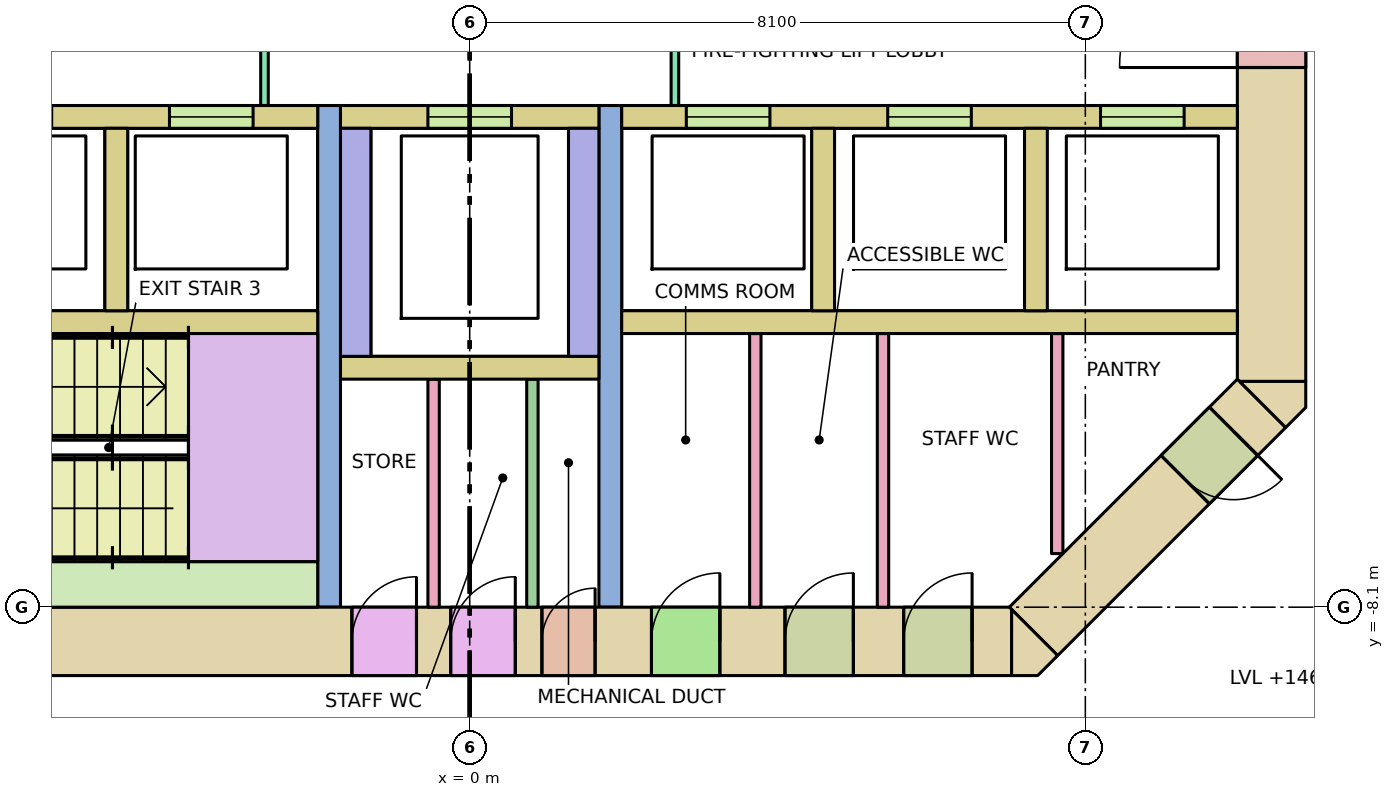
"""IFC4 building model, lengths in metres.
Left out: names, types, materials, properties, quantities, classifications, styles, units other than length and angle.
Written with IfcOpenShell. Run it as: python <this file> out.ifc"""

import sys

from ifc_helpers import new_model, si_unit, direction, frame, frame_2d, origin, place, context, subcontext, project, spatial, polyline, rectangle, outline, extrude, element, fill, save


model = new_model("IFC4")
c1 = context("Model", 3, precision=1e-05, world=origin(), true_north=direction((0.0, 1.0)))
c2 = subcontext(c1, "Body", "Model", "MODEL_VIEW")
j1 = project(units=[si_unit("LENGTHUNIT", "METRE"), si_unit("PLANEANGLEUNIT", "RADIAN")], contexts=[c1])
p1 = place(None, origin())
s1 = spatial("IfcSite", under=j1, at=p1, CompositionType="ELEMENT")
p2 = place(p1, origin())
s2 = spatial("IfcBuilding", under=s1, at=p2, CompositionType="ELEMENT")
p3 = place(p2, frame((0.0, 0.0, 146.6)))
s3 = spatial("IfcBuildingStorey", under=s2, at=p3, CompositionType="ELEMENT", Elevation=146.6)
p4 = place(p3, frame((-7.13, -8.55, -0.28), z_axis=(0.0, 0.0, 1.0), x_axis=(1.0, 0.0, 0.0)))
e1 = element("IfcWall", 1, at=p4, inside=s3, PredefinedType="SHEAR", context=c2, shape_type="SweptSolid", body=[
    extrude(rectangle(XDim=14.26, YDim=0.9, at=frame_2d((7.13, 0.0))), origin(), (0.0, 0.0, 1.0), 7.6),
])
p5 = place(p4, frame((8.08, 0.0, 0.28)))
e2 = element("IfcOpeningElement", 2, at=p5, cuts=e1, PredefinedType="OPENING", context=c2, shape_type="SweptSolid", body=[
    extrude(rectangle(XDim=0.7, YDim=2.1, at=frame_2d((0.35, 1.05))), frame((0.0, 0.46, 0.0), z_axis=(0.0, -1.0, 0.0), x_axis=(1.0, 0.0, 0.0)), (0.0, 0.0, 1.0), 0.92),
])
p6 = place(p4, frame((5.58, 0.0, 0.28)))
e3 = element("IfcOpeningElement", 3, at=p6, cuts=e1, PredefinedType="OPENING", context=c2, shape_type="SweptSolid", body=[
    extrude(rectangle(XDim=0.85, YDim=2.1, at=frame_2d((0.425, 1.05))), frame((0.0, 0.46, 0.0), z_axis=(0.0, -1.0, 0.0), x_axis=(1.0, 0.0, 0.0)), (0.0, 0.0, 1.0), 0.92),
])
p7 = place(p4, frame((6.88, 0.0, 0.28)))
e4 = element("IfcOpeningElement", 4, at=p7, cuts=e1, PredefinedType="OPENING", context=c2, shape_type="SweptSolid", body=[
    extrude(rectangle(XDim=0.85, YDim=2.1, at=frame_2d((0.425, 1.05))), frame((0.0, 0.46, 0.0), z_axis=(0.0, -1.0, 0.0), x_axis=(1.0, 0.0, 0.0)), (0.0, 0.0, 1.0), 0.92),
])
p8 = place(p4, frame((9.521, 0.0, 0.28)))
e5 = element("IfcOpeningElement", 5, at=p8, cuts=e1, PredefinedType="OPENING", context=c2, shape_type="SweptSolid", body=[
    extrude(rectangle(XDim=0.9, YDim=2.1, at=frame_2d((0.45, 1.05))), frame((0.0, 0.46, 0.0), z_axis=(0.0, -1.0, 0.0), x_axis=(1.0, 0.0, 0.0)), (0.0, 0.0, 1.0), 0.92),
])
p9 = place(p4, frame((11.278, 0.0, 0.28)))
e6 = element("IfcOpeningElement", 6, at=p9, cuts=e1, PredefinedType="OPENING", context=c2, shape_type="SweptSolid", body=[
    extrude(rectangle(XDim=0.9, YDim=2.1, at=frame_2d((0.45, 1.05))), frame((0.0, 0.46, 0.0), z_axis=(0.0, -1.0, 0.0), x_axis=(1.0, 0.0, 0.0)), (0.0, 0.0, 1.0), 0.92),
])
p10 = place(p4, frame((12.84, 0.0, 0.28)))
e7 = element("IfcOpeningElement", 7, at=p10, cuts=e1, PredefinedType="OPENING", context=c2, shape_type="SweptSolid", body=[
    extrude(rectangle(XDim=0.9, YDim=2.1, at=frame_2d((0.45, 1.05))), frame((0.0, 0.46, 0.0), z_axis=(0.0, -1.0, 0.0), x_axis=(1.0, 0.0, 0.0)), (0.0, 0.0, 1.0), 0.92),
])
p11 = place(p3, frame((10.55, -5.13, -0.28), z_axis=(0.0, 0.0, 1.0), x_axis=(0.0, 1.0, 0.0)))
e8 = element("IfcWall", 8, at=p11, inside=s3, PredefinedType="SHEAR", context=c2, shape_type="SweptSolid", body=[
    extrude(rectangle(XDim=10.26, YDim=0.9, at=frame_2d((5.13, 0.0))), origin(), (0.0, 0.0, 1.0), 7.6),
])
p12 = place(p11, frame((4.13, 0.0, 0.28)))
e9 = element("IfcOpeningElement", 9, at=p12, cuts=e8, PredefinedType="OPENING", context=c2, shape_type="SweptSolid", body=[
    extrude(rectangle(XDim=2.0, YDim=2.1, at=frame_2d((1.0, 1.05))), frame((0.0, 0.46, 0.0), z_axis=(0.0, -1.0, 0.0), x_axis=(1.0, 0.0, 0.0)), (0.0, 0.0, 1.0), 0.92),
])
p13 = place(p3, frame((10.418, -5.418, -0.28), z_axis=(0.0, 0.0, 1.0), x_axis=(-0.707106781187, -0.707106781187, 0.0)))
e10 = element("IfcWall", 10, at=p13, inside=s3, PredefinedType="SHEAR", context=c2, shape_type="SweptSolid", body=[
    extrude(rectangle(XDim=4.243, YDim=0.9, at=frame_2d((2.121, 0.0))), origin(), (0.0, 0.0, 1.0), 7.6),
])
p14 = place(p13, frame((0.52, 0.0, 0.28)))
e11 = element("IfcOpeningElement", 11, at=p14, cuts=e10, PredefinedType="OPENING", context=c2, shape_type="SweptSolid", body=[
    extrude(rectangle(XDim=0.9, YDim=2.1, at=frame_2d((0.45, 1.05))), frame((0.0, 0.46, 0.0), z_axis=(0.0, -1.0, 0.0), x_axis=(1.0, 0.0, 0.0)), (0.0, 0.0, 1.0), 0.92),
])
p15 = place(p3, frame((0.0, 0.0, -0.28)))
e12 = element("IfcWall", 12, at=p15, inside=s3, PredefinedType="SHEAR", context=c2, shape_type="SweptSolid", body=[
    extrude(outline(polyline([(7.473, -9.0), (7.13, -9.0), (7.13, -8.13), (7.736, -8.736), (7.473, -9.0)])), origin(), (0.0, 0.0, 1.0), 7.6),
])
p16 = place(p3, frame((0.0, 0.0, -0.28)))
e13 = element("IfcWall", 13, at=p16, inside=s3, PredefinedType="SHEAR", context=c2, shape_type="SweptSolid", body=[
    extrude(outline(polyline([(11.0, -5.473), (10.736, -5.736), (10.13, -5.13), (11.0, -5.13), (11.0, -5.473)])), origin(), (0.0, 0.0, 1.0), 7.6),
])
for number, where, z_axis, x_axis in (
    (14, (-10.1, -4.35, 0.0), (0.0, 0.0, 1.0), (1.0, 0.0, 0.0)),
    (15, (2.0, -4.35, 0.0), (0.0, 0.0, 1.0), (1.0, 0.0, 0.0)),
):
    element("IfcWall", number, at=place(p3, frame(where, z_axis=z_axis, x_axis=x_axis)), inside=s3, PredefinedType="SOLIDWALL", context=c2, shape_type="SweptSolid", body=[
        extrude(rectangle(XDim=8.1, YDim=0.3, at=frame_2d((4.05, 0.0))), origin(), (0.0, 0.0, 1.0), 7.32),
    ])
p17 = place(p3, frame((-10.1, -1.65, 0.0), z_axis=(0.0, 0.0, 1.0), x_axis=(1.0, 0.0, 0.0)))
e16 = element("IfcWall", 16, at=p17, inside=s3, PredefinedType="SOLIDWALL", context=c2, shape_type="SweptSolid", body=[
    extrude(rectangle(XDim=8.1, YDim=0.3, at=frame_2d((4.05, 0.0))), origin(), (0.0, 0.0, 1.0), 7.32),
])
p18 = place(p17, frame((0.7, 0.0, 0.0)))
e17 = element("IfcOpeningElement", 17, at=p18, cuts=e16, PredefinedType="OPENING", context=c2, shape_type="SweptSolid", body=[
    extrude(rectangle(XDim=1.1, YDim=2.1, at=frame_2d((0.55, 1.05))), frame((0.0, 0.16, 0.0), z_axis=(0.0, -1.0, 0.0), x_axis=(1.0, 0.0, 0.0)), (0.0, 0.0, 1.0), 0.32),
])
p19 = place(p17, frame((3.5, 0.0, 0.0)))
e18 = element("IfcOpeningElement", 18, at=p19, cuts=e16, PredefinedType="OPENING", context=c2, shape_type="SweptSolid", body=[
    extrude(rectangle(XDim=1.1, YDim=2.1, at=frame_2d((0.55, 1.05))), frame((0.0, 0.16, 0.0), z_axis=(0.0, -1.0, 0.0), x_axis=(1.0, 0.0, 0.0)), (0.0, 0.0, 1.0), 0.32),
])
p20 = place(p17, frame((6.15, 0.0, 0.0)))
e19 = element("IfcOpeningElement", 19, at=p20, cuts=e16, PredefinedType="OPENING", context=c2, shape_type="SweptSolid", body=[
    extrude(rectangle(XDim=1.1, YDim=2.1, at=frame_2d((0.55, 1.05))), frame((0.0, 0.16, 0.0), z_axis=(0.0, -1.0, 0.0), x_axis=(1.0, 0.0, 0.0)), (0.0, 0.0, 1.0), 0.32),
])
p21 = place(p3, frame((2.0, -1.65, 0.0), z_axis=(0.0, 0.0, 1.0), x_axis=(1.0, 0.0, 0.0)))
e20 = element("IfcWall", 20, at=p21, inside=s3, PredefinedType="SOLIDWALL", context=c2, shape_type="SweptSolid", body=[
    extrude(rectangle(XDim=8.1, YDim=0.3, at=frame_2d((4.05, 0.0))), origin(), (0.0, 0.0, 1.0), 7.32),
])
p22 = place(p21, frame((0.85, 0.0, 0.0)))
e21 = element("IfcOpeningElement", 21, at=p22, cuts=e20, PredefinedType="OPENING", context=c2, shape_type="SweptSolid", body=[
    extrude(rectangle(XDim=1.1, YDim=2.1, at=frame_2d((0.55, 1.05))), frame((0.0, 0.16, 0.0), z_axis=(0.0, -1.0, 0.0), x_axis=(1.0, 0.0, 0.0)), (0.0, 0.0, 1.0), 0.32),
])
p23 = place(p21, frame((3.5, 0.0, 0.0)))
e22 = element("IfcOpeningElement", 22, at=p23, cuts=e20, PredefinedType="OPENING", context=c2, shape_type="SweptSolid", body=[
    extrude(rectangle(XDim=1.1, YDim=2.1, at=frame_2d((0.55, 1.05))), frame((0.0, 0.16, 0.0), z_axis=(0.0, -1.0, 0.0), x_axis=(1.0, 0.0, 0.0)), (0.0, 0.0, 1.0), 0.32),
])
p24 = place(p21, frame((6.3, 0.0, 0.0)))
e23 = element("IfcOpeningElement", 23, at=p24, cuts=e20, PredefinedType="OPENING", context=c2, shape_type="SweptSolid", body=[
    extrude(rectangle(XDim=1.1, YDim=2.1, at=frame_2d((0.55, 1.05))), frame((0.0, 0.16, 0.0), z_axis=(0.0, -1.0, 0.0), x_axis=(1.0, 0.0, 0.0)), (0.0, 0.0, 1.0), 0.32),
])
for number, where, z_axis, x_axis in (
    (24, (-4.65, -4.2, 0.0), (0.0, 0.0, 1.0), (0.0, 1.0, 0.0)),
    (25, (4.65, -4.2, 0.0), (0.0, 0.0, 1.0), (0.0, 1.0, 0.0)),
    (26, (7.45, -4.2, 0.0), (0.0, 0.0, 1.0), (0.0, 1.0, 0.0)),
):
    element("IfcWall", number, at=place(p3, frame(where, z_axis=z_axis, x_axis=x_axis)), inside=s3, PredefinedType="SOLIDWALL", context=c2, shape_type="SweptSolid", body=[
        extrude(rectangle(XDim=2.4, YDim=0.3, at=frame_2d((1.2, 0.0))), origin(), (0.0, 0.0, 1.0), 7.32),
    ])
for number, where, z_axis, x_axis in (
    (27, (-1.85, -8.1, 0.0), (0.0, 0.0, 1.0), (0.0, 1.0, 0.0)),
    (28, (1.85, -8.1, 0.0), (0.0, 0.0, 1.0), (0.0, 1.0, 0.0)),
):
    element("IfcWall", number, at=place(p3, frame(where, z_axis=z_axis, x_axis=x_axis)), inside=s3, PredefinedType="SHEAR", context=c2, shape_type="SweptSolid", body=[
        extrude(rectangle(XDim=6.6, YDim=0.3, at=frame_2d((3.3, 0.0))), origin(), (0.0, 0.0, 1.0), 7.32),
    ])
p25 = place(p3, frame((-1.7, -1.65, 0.0), z_axis=(0.0, 0.0, 1.0), x_axis=(1.0, 0.0, 0.0)))
e29 = element("IfcWall", 29, at=p25, inside=s3, PredefinedType="SOLIDWALL", context=c2, shape_type="SweptSolid", body=[
    extrude(rectangle(XDim=3.4, YDim=0.3, at=frame_2d((1.7, 0.0))), origin(), (0.0, 0.0, 1.0), 7.32),
])
p26 = place(p25, frame((1.15, 0.0, 0.0)))
e30 = element("IfcOpeningElement", 30, at=p26, cuts=e29, PredefinedType="OPENING", context=c2, shape_type="SweptSolid", body=[
    extrude(rectangle(XDim=1.1, YDim=2.1, at=frame_2d((0.55, 1.05))), frame((0.0, 0.16, 0.0), z_axis=(0.0, -1.0, 0.0), x_axis=(1.0, 0.0, 0.0)), (0.0, 0.0, 1.0), 0.32),
])
for number, where, z_axis, x_axis in (
    (31, (-1.5, -4.8, 0.0), (0.0, 0.0, 1.0), (0.0, 1.0, 0.0)),
    (32, (1.5, -4.8, 0.0), (0.0, 0.0, 1.0), (0.0, 1.0, 0.0)),
):
    element("IfcWall", number, at=place(p3, frame(where, z_axis=z_axis, x_axis=x_axis)), inside=s3, PredefinedType="SOLIDWALL", context=c2, shape_type="SweptSolid", body=[
        extrude(rectangle(XDim=3.0, YDim=0.4, at=frame_2d((1.5, 0.0))), origin(), (0.0, 0.0, 1.0), 7.32),
    ])
p27 = place(p3, frame((-1.7, -4.95, 0.0), z_axis=(0.0, 0.0, 1.0), x_axis=(1.0, 0.0, 0.0)))
e33 = element("IfcWall", 33, at=p27, inside=s3, PredefinedType="SOLIDWALL", context=c2, shape_type="SweptSolid", body=[
    extrude(rectangle(XDim=3.4, YDim=0.3, at=frame_2d((1.7, 0.0))), origin(), (0.0, 0.0, 1.0), 7.32),
])
p28 = place(p3, frame((-7.37, -7.8, 0.0), z_axis=(0.0, 0.0, 1.0), x_axis=(1.0, 0.0, 0.0)))
e34 = element("IfcWall", 34, at=p28, inside=s3, PredefinedType="SHEAR", context=c2, shape_type="SweptSolid", body=[
    extrude(rectangle(XDim=5.37, YDim=0.6, at=frame_2d((2.685, 0.0))), origin(), (0.0, 0.0, 1.0), 7.32),
])
p29 = place(p3, frame((-2.7, -1.5, 0.0), z_axis=(0.0, 0.0, 1.0), x_axis=(0.0, 1.0, 0.0)))
e35 = element("IfcWall", 35, at=p29, inside=s3, PredefinedType="PARTITIONING", context=c2, shape_type="SweptSolid", body=[
    extrude(rectangle(XDim=3.0, YDim=0.1, at=frame_2d((1.5, 0.0))), origin(), (0.0, 0.0, 1.0), 7.32),
])
p30 = place(p29, frame((0.9, 0.0, 0.0)))
e36 = element("IfcOpeningElement", 36, at=p30, cuts=e35, PredefinedType="OPENING", context=c2, shape_type="SweptSolid", body=[
    extrude(rectangle(XDim=1.2, YDim=2.1, at=frame_2d((0.6, 1.05))), frame((0.0, 0.06, 0.0), z_axis=(0.0, -1.0, 0.0), x_axis=(1.0, 0.0, 0.0)), (0.0, 0.0, 1.0), 0.12),
])
p31 = place(p3, frame((2.7, -1.5, 0.0), z_axis=(0.0, 0.0, 1.0), x_axis=(0.0, 1.0, 0.0)))
e37 = element("IfcWall", 37, at=p31, inside=s3, PredefinedType="PARTITIONING", context=c2, shape_type="SweptSolid", body=[
    extrude(rectangle(XDim=3.0, YDim=0.1, at=frame_2d((1.5, 0.0))), origin(), (0.0, 0.0, 1.0), 7.32),
])
p32 = place(p31, frame((0.9, 0.0, 0.0)))
e38 = element("IfcOpeningElement", 38, at=p32, cuts=e37, PredefinedType="OPENING", context=c2, shape_type="SweptSolid", body=[
    extrude(rectangle(XDim=1.2, YDim=2.1, at=frame_2d((0.6, 1.05))), frame((0.0, 0.06, 0.0), z_axis=(0.0, -1.0, 0.0), x_axis=(1.0, 0.0, 0.0)), (0.0, 0.0, 1.0), 0.12),
])
for number, where, z_axis, x_axis in (
    (39, (0.825, -8.1, 0.0), (0.0, 0.0, 1.0), (0.0, 1.0, 0.0)),
    (40, (-0.475, -8.1, 0.0), (0.0, 0.0, 1.0), (0.0, 1.0, 0.0)),
):
    element("IfcWall", number, at=place(p3, frame(where, z_axis=z_axis, x_axis=x_axis)), inside=s3, PredefinedType="PARTITIONING", context=c2, shape_type="SweptSolid", body=[
        extrude(rectangle(XDim=3.0, YDim=0.15, at=frame_2d((1.5, 0.0))), origin(), (0.0, 0.0, 1.0), 7.32),
    ])
for number, where, z_axis, x_axis in (
    (41, (3.758, -8.1, 0.0), (0.0, 0.0, 1.0), (0.0, 1.0, 0.0)),
    (42, (5.438, -8.1, 0.0), (0.0, 0.0, 1.0), (0.0, 1.0, 0.0)),
):
    element("IfcWall", number, at=place(p3, frame(where, z_axis=z_axis, x_axis=x_axis)), inside=s3, PredefinedType="PARTITIONING", context=c2, shape_type="SweptSolid", body=[
        extrude(rectangle(XDim=3.6, YDim=0.15, at=frame_2d((1.8, 0.0))), origin(), (0.0, 0.0, 1.0), 7.32),
    ])
p33 = place(p3, frame((7.73, -7.395, 0.0), z_axis=(0.0, 0.0, 1.0), x_axis=(0.0, 1.0, 0.0)))
e43 = element("IfcWall", 43, at=p33, inside=s3, PredefinedType="PARTITIONING", context=c2, shape_type="SweptSolid", body=[
    extrude(rectangle(XDim=2.895, YDim=0.15, at=frame_2d((1.448, 0.0))), origin(), (0.0, 0.0, 1.0), 7.32),
])
p34 = place(p3, frame((15.238, -7.281, 0.0), z_axis=(0.0, 0.0, 1.0), x_axis=(-0.707106781187, -0.707106781187, 0.0)))
e44 = element("IfcWall", 44, at=p34, inside=s3, PredefinedType="PARTITIONING", context=c2, shape_type="SweptSolid", body=[
    extrude(rectangle(XDim=8.425, YDim=0.15, at=frame_2d((4.212, 0.0))), origin(), (0.0, 0.0, 1.0), 6.52),
])
p35 = place(p34, frame((3.967, 0.0, 0.0)))
e45 = element("IfcOpeningElement", 45, at=p35, cuts=e44, PredefinedType="OPENING", context=c2, shape_type="SweptSolid", body=[
    extrude(rectangle(XDim=1.8, YDim=2.1, at=frame_2d((0.9, 1.05))), frame((0.0, 0.085, 0.0), z_axis=(0.0, -1.0, 0.0), x_axis=(1.0, 0.0, 0.0)), (0.0, 0.0, 1.0), 0.17),
])
p36 = place(p20, origin())
e46 = element("IfcDoor", 46, at=p36, inside=s3, OperationType="DOUBLE_DOOR_SLIDING", PredefinedType="DOOR", context=c2, shape_type="SweptSolid", body=[
    extrude(rectangle(XDim=1.1, YDim=2.1, at=frame_2d((0.55, 1.05))), frame((0.0, 0.025, 0.0), z_axis=(0.0, -1.0, 0.0), x_axis=(1.0, 0.0, 0.0)), (0.0, 0.0, 1.0), 0.05),
])
fill(e19, e46)
p37 = place(p22, origin())
e47 = element("IfcDoor", 47, at=p37, inside=s3, OperationType="DOUBLE_DOOR_SLIDING", PredefinedType="DOOR", context=c2, shape_type="SweptSolid", body=[
    extrude(rectangle(XDim=1.1, YDim=2.1, at=frame_2d((0.55, 1.05))), frame((0.0, 0.025, 0.0), z_axis=(0.0, -1.0, 0.0), x_axis=(1.0, 0.0, 0.0)), (0.0, 0.0, 1.0), 0.05),
])
fill(e21, e47)
p38 = place(p23, origin())
e48 = element("IfcDoor", 48, at=p38, inside=s3, OperationType="DOUBLE_DOOR_SLIDING", PredefinedType="DOOR", context=c2, shape_type="SweptSolid", body=[
    extrude(rectangle(XDim=1.1, YDim=2.1, at=frame_2d((0.55, 1.05))), frame((0.0, 0.025, 0.0), z_axis=(0.0, -1.0, 0.0), x_axis=(1.0, 0.0, 0.0)), (0.0, 0.0, 1.0), 0.05),
])
fill(e22, e48)
p39 = place(p24, origin())
e49 = element("IfcDoor", 49, at=p39, inside=s3, OperationType="DOUBLE_DOOR_SLIDING", PredefinedType="DOOR", context=c2, shape_type="SweptSolid", body=[
    extrude(rectangle(XDim=1.1, YDim=2.1, at=frame_2d((0.55, 1.05))), frame((0.0, 0.025, 0.0), z_axis=(0.0, -1.0, 0.0), x_axis=(1.0, 0.0, 0.0)), (0.0, 0.0, 1.0), 0.05),
])
fill(e23, e49)
p40 = place(p26, origin())
e50 = element("IfcDoor", 50, at=p40, inside=s3, OperationType="DOUBLE_DOOR_SLIDING", PredefinedType="DOOR", context=c2, shape_type="SweptSolid", body=[
    extrude(rectangle(XDim=1.1, YDim=2.1, at=frame_2d((0.55, 1.05))), frame((0.0, 0.025, 0.0), z_axis=(0.0, -1.0, 0.0), x_axis=(1.0, 0.0, 0.0)), (0.0, 0.0, 1.0), 0.05),
])
fill(e30, e50)
p41 = place(p12, origin())
e51 = element("IfcDoor", 51, at=p41, inside=s3, OperationType="DOUBLE_DOOR_SINGLE_SWING", PredefinedType="DOOR", context=c2, shape_type="SweptSolid", body=[
    extrude(rectangle(XDim=2.0, YDim=2.1, at=frame_2d((1.0, 1.05))), frame((0.0, 0.025, 0.0), z_axis=(0.0, -1.0, 0.0), x_axis=(1.0, 0.0, 0.0)), (0.0, 0.0, 1.0), 0.05),
])
fill(e9, e51)
p42 = place(p5, origin())
e52 = element("IfcDoor", 52, at=p42, inside=s3, OperationType="SINGLE_SWING_RIGHT", PredefinedType="DOOR", context=c2, shape_type="SweptSolid", body=[
    extrude(rectangle(XDim=0.7, YDim=2.1, at=frame_2d((0.35, 1.05))), frame((0.0, 0.025, 0.0), z_axis=(0.0, -1.0, 0.0), x_axis=(1.0, 0.0, 0.0)), (0.0, 0.0, 1.0), 0.05),
])
fill(e2, e52)
p43 = place(p6, origin())
e53 = element("IfcDoor", 53, at=p43, inside=s3, OperationType="SINGLE_SWING_RIGHT", PredefinedType="DOOR", context=c2, shape_type="SweptSolid", body=[
    extrude(rectangle(XDim=0.85, YDim=2.1, at=frame_2d((0.425, 1.05))), frame((0.0, 0.025, 0.0), z_axis=(0.0, -1.0, 0.0), x_axis=(1.0, 0.0, 0.0)), (0.0, 0.0, 1.0), 0.05),
])
fill(e3, e53)
p44 = place(p7, origin())
e54 = element("IfcDoor", 54, at=p44, inside=s3, OperationType="SINGLE_SWING_RIGHT", PredefinedType="DOOR", context=c2, shape_type="SweptSolid", body=[
    extrude(rectangle(XDim=0.85, YDim=2.1, at=frame_2d((0.425, 1.05))), frame((0.0, 0.025, 0.0), z_axis=(0.0, -1.0, 0.0), x_axis=(1.0, 0.0, 0.0)), (0.0, 0.0, 1.0), 0.05),
])
fill(e4, e54)
p45 = place(p8, origin())
e55 = element("IfcDoor", 55, at=p45, inside=s3, OperationType="SINGLE_SWING_RIGHT", PredefinedType="DOOR", context=c2, shape_type="SweptSolid", body=[
    extrude(rectangle(XDim=0.9, YDim=2.1, at=frame_2d((0.45, 1.05))), frame((0.0, 0.025, 0.0), z_axis=(0.0, -1.0, 0.0), x_axis=(1.0, 0.0, 0.0)), (0.0, 0.0, 1.0), 0.05),
])
fill(e5, e55)
p46 = place(p9, origin())
e56 = element("IfcDoor", 56, at=p46, inside=s3, OperationType="SINGLE_SWING_RIGHT", PredefinedType="DOOR", context=c2, shape_type="SweptSolid", body=[
    extrude(rectangle(XDim=0.9, YDim=2.1, at=frame_2d((0.45, 1.05))), frame((0.0, 0.025, 0.0), z_axis=(0.0, -1.0, 0.0), x_axis=(1.0, 0.0, 0.0)), (0.0, 0.0, 1.0), 0.05),
])
fill(e6, e56)
p47 = place(p10, origin())
e57 = element("IfcDoor", 57, at=p47, inside=s3, OperationType="SINGLE_SWING_RIGHT", PredefinedType="DOOR", context=c2, shape_type="SweptSolid", body=[
    extrude(rectangle(XDim=0.9, YDim=2.1, at=frame_2d((0.45, 1.05))), frame((0.0, 0.025, 0.0), z_axis=(0.0, -1.0, 0.0), x_axis=(1.0, 0.0, 0.0)), (0.0, 0.0, 1.0), 0.05),
])
fill(e7, e57)
p48 = place(p14, origin())
e58 = element("IfcDoor", 58, at=p48, inside=s3, OperationType="SINGLE_SWING_LEFT", PredefinedType="DOOR", context=c2, shape_type="SweptSolid", body=[
    extrude(rectangle(XDim=0.9, YDim=2.1, at=frame_2d((0.45, 1.05))), frame((0.0, 0.025, 0.0), z_axis=(0.0, -1.0, 0.0), x_axis=(1.0, 0.0, 0.0)), (0.0, 0.0, 1.0), 0.05),
])
fill(e11, e58)
save(model, sys.argv[1])
